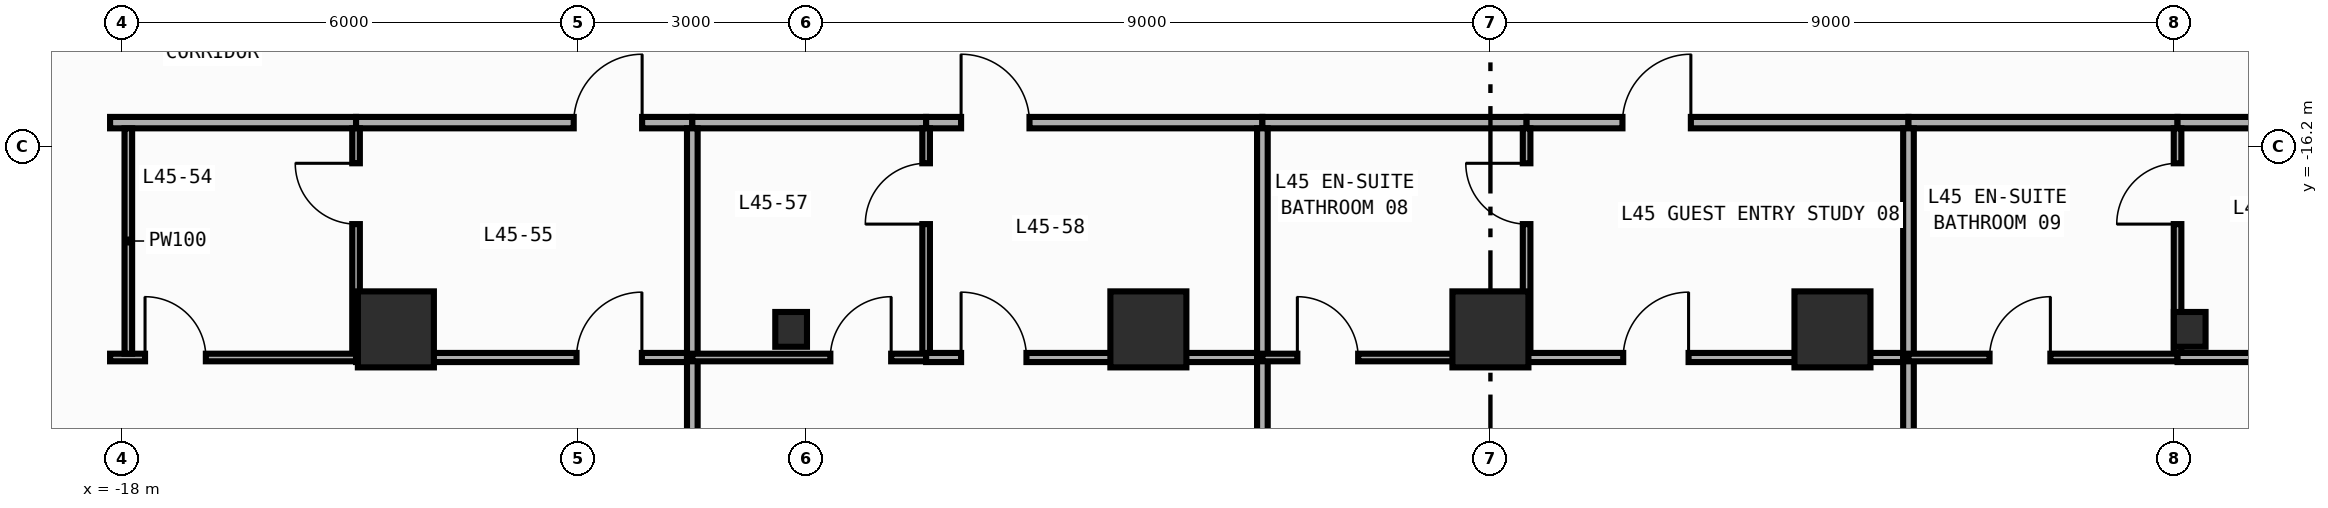
"""IFC4 building model, lengths in metres.
Left out: names, types, materials, properties, quantities, classifications, styles, units other than length and angle.
Written with IfcOpenShell. Run it as: python <this file> out.ifc"""

import sys

from ifc_helpers import new_model, si_unit, direction, frame, frame_2d, origin, origin_2d, place, context, subcontext, project, spatial, rectangle, i_section, extrude, element, fill, save


model = new_model("IFC4")
c1 = context("Model", 3, precision=1e-05, world=origin(), true_north=direction((0.0, 1.0)))
c2 = subcontext(c1, "Body", "Model", "MODEL_VIEW")
j1 = project(units=[si_unit("LENGTHUNIT", "METRE"), si_unit("PLANEANGLEUNIT", "RADIAN")], contexts=[c1])
p1 = place(None, origin())
s1 = spatial("IfcSite", under=j1, at=p1, CompositionType="ELEMENT")
p2 = place(p1, origin())
s2 = spatial("IfcBuilding", under=s1, at=p2, CompositionType="ELEMENT")
p3 = place(p2, frame((0.0, 0.0, 195.4)))
s3 = spatial("IfcBuildingStorey", under=s2, at=p3, CompositionType="ELEMENT", Elevation=195.4)
for number, where, z_axis, x_axis in (
    (1, (-9.2, -18.6, 0.0), (0.0, 0.0, 1.0), (1.0, 0.0, 0.0)),
    (2, (9.2, -18.6, 0.0), (0.0, 0.0, 1.0), (1.0, 0.0, 0.0)),
):
    element("IfcColumn", number, at=place(p3, frame(where, z_axis=z_axis, x_axis=x_axis)), inside=s3, PredefinedType="COLUMN", context=c2, shape_type="SweptSolid", body=[
        extrude(i_section(OverallWidth=0.417, OverallDepth=0.458, WebThickness=0.03, FlangeThickness=0.05, FilletRadius=0.022, at=origin_2d()), origin(), (0.0, 0.0, 1.0), 3.8),
    ])
for number, where, z_axis, x_axis in (
    (3, (-14.4, -18.6, 0.0), (0.0, 0.0, 1.0), (1.0, 0.0, 0.0)),
    (4, (-4.5, -18.6, 0.0), (0.0, 0.0, 1.0), (1.0, 0.0, 0.0)),
    (5, (0.0, -18.6, 0.0), (0.0, 0.0, 1.0), (1.0, 0.0, 0.0)),
    (6, (4.5, -18.6, 0.0), (0.0, 0.0, 1.0), (1.0, 0.0, 0.0)),
):
    element("IfcColumn", number, at=place(p3, frame(where, z_axis=z_axis, x_axis=x_axis)), inside=s3, PredefinedType="COLUMN", context=c2, shape_type="SweptSolid", body=[
        extrude(rectangle(XDim=1.0, YDim=1.0, at=origin_2d()), origin(), (0.0, 0.0, 1.0), 3.8),
    ])
p4 = place(p3, frame((-18.16, -15.88, 0.0), z_axis=(0.0, 0.0, 1.0), x_axis=(1.0, 0.0, 0.0)))
e7 = element("IfcWall", 7, at=p4, inside=s3, PredefinedType="PARTITIONING", context=c2, shape_type="SweptSolid", body=[
    extrude(rectangle(XDim=3.236, YDim=0.15, at=frame_2d((1.618, 0.0))), origin(), (0.0, 0.0, 1.0), 3.54),
])
p5 = place(p3, frame((-14.924, -15.88, 0.0), z_axis=(0.0, 0.0, 1.0), x_axis=(1.0, 0.0, 0.0)))
e8 = element("IfcWall", 8, at=p5, inside=s3, PredefinedType="PARTITIONING", context=c2, shape_type="SweptSolid", body=[
    extrude(rectangle(XDim=4.424, YDim=0.15, at=frame_2d((2.212, 0.0))), origin(), (0.0, 0.0, 1.0), 3.54),
])
p6 = place(p5, frame((2.864, 0.0, 0.0)))
e9 = element("IfcOpeningElement", 9, at=p6, cuts=e8, PredefinedType="OPENING", context=c2, shape_type="SweptSolid", body=[
    extrude(rectangle(XDim=0.9, YDim=2.15, at=frame_2d((0.45, 1.075))), frame((0.0, 0.085, 0.0), z_axis=(0.0, -1.0, 0.0), x_axis=(1.0, 0.0, 0.0)), (0.0, 0.0, 1.0), 0.17),
])
p7 = place(p3, frame((-10.5, -15.88, 0.0), z_axis=(0.0, 0.0, 1.0), x_axis=(1.0, 0.0, 0.0)))
e10 = element("IfcWall", 10, at=p7, inside=s3, PredefinedType="PARTITIONING", context=c2, shape_type="SweptSolid", body=[
    extrude(rectangle(XDim=3.076, YDim=0.15, at=frame_2d((1.538, 0.0))), origin(), (0.0, 0.0, 1.0), 3.54),
])
p8 = place(p3, frame((-7.424, -15.88, 0.0), z_axis=(0.0, 0.0, 1.0), x_axis=(1.0, 0.0, 0.0)))
e11 = element("IfcWall", 11, at=p8, inside=s3, PredefinedType="PARTITIONING", context=c2, shape_type="SweptSolid", body=[
    extrude(rectangle(XDim=4.424, YDim=0.15, at=frame_2d((2.212, 0.0))), origin(), (0.0, 0.0, 1.0), 3.54),
])
p9 = place(p8, frame((0.46, 0.0, 0.0)))
e12 = element("IfcOpeningElement", 12, at=p9, cuts=e11, PredefinedType="OPENING", context=c2, shape_type="SweptSolid", body=[
    extrude(rectangle(XDim=0.9, YDim=2.15, at=frame_2d((0.45, 1.075))), frame((0.0, 0.085, 0.0), z_axis=(0.0, -1.0, 0.0), x_axis=(1.0, 0.0, 0.0)), (0.0, 0.0, 1.0), 0.17),
])
p10 = place(p3, frame((-3.0, -15.88, 0.0), z_axis=(0.0, 0.0, 1.0), x_axis=(1.0, 0.0, 0.0)))
e13 = element("IfcWall", 13, at=p10, inside=s3, PredefinedType="PARTITIONING", context=c2, shape_type="SweptSolid", body=[
    extrude(rectangle(XDim=3.476, YDim=0.15, at=frame_2d((1.738, 0.0))), origin(), (0.0, 0.0, 1.0), 3.54),
])
p11 = place(p3, frame((0.476, -15.88, 0.0), z_axis=(0.0, 0.0, 1.0), x_axis=(1.0, 0.0, 0.0)))
e14 = element("IfcWall", 14, at=p11, inside=s3, PredefinedType="PARTITIONING", context=c2, shape_type="SweptSolid", body=[
    extrude(rectangle(XDim=5.024, YDim=0.15, at=frame_2d((2.512, 0.0))), origin(), (0.0, 0.0, 1.0), 3.54),
])
p12 = place(p11, frame((1.261, 0.0, 0.0)))
e15 = element("IfcOpeningElement", 15, at=p12, cuts=e14, PredefinedType="OPENING", context=c2, shape_type="SweptSolid", body=[
    extrude(rectangle(XDim=0.9, YDim=2.15, at=frame_2d((0.45, 1.075))), frame((0.0, 0.085, 0.0), z_axis=(0.0, -1.0, 0.0), x_axis=(1.0, 0.0, 0.0)), (0.0, 0.0, 1.0), 0.17),
])
p13 = place(p3, frame((5.5, -15.88, 0.0), z_axis=(0.0, 0.0, 1.0), x_axis=(1.0, 0.0, 0.0)))
e16 = element("IfcWall", 16, at=p13, inside=s3, PredefinedType="PARTITIONING", context=c2, shape_type="SweptSolid", body=[
    extrude(rectangle(XDim=3.54, YDim=0.15, at=frame_2d((1.77, 0.0))), origin(), (0.0, 0.0, 1.0), 3.54),
])
p14 = place(p3, frame((9.04, -15.88, 0.0), z_axis=(0.0, 0.0, 1.0), x_axis=(1.0, 0.0, 0.0)))
e17 = element("IfcWall", 17, at=p14, inside=s3, PredefinedType="PARTITIONING", context=c2, shape_type="SweptSolid", body=[
    extrude(rectangle(XDim=3.2, YDim=0.15, at=frame_2d((1.6, 0.0))), origin(), (0.0, 0.0, 1.0), 3.54),
])
p15 = place(p14, frame((1.61, 0.0, 0.0)))
e18 = element("IfcOpeningElement", 18, at=p15, cuts=e17, PredefinedType="OPENING", context=c2, shape_type="SweptSolid", body=[
    extrude(rectangle(XDim=0.9, YDim=2.15, at=frame_2d((0.45, 1.075))), frame((0.0, 0.085, 0.0), z_axis=(0.0, -1.0, 0.0), x_axis=(1.0, 0.0, 0.0)), (0.0, 0.0, 1.0), 0.17),
])
p16 = place(p3, frame((-14.924, -18.92, 0.0), z_axis=(0.0, 0.0, 1.0), x_axis=(0.0, 1.0, 0.0)))
e19 = element("IfcWall", 19, at=p16, inside=s3, PredefinedType="PARTITIONING", context=c2, shape_type="SweptSolid", body=[
    extrude(rectangle(XDim=2.965, YDim=0.1, at=frame_2d((1.482, 0.0))), origin(), (0.0, 0.0, 1.0), 3.54),
])
p17 = place(p16, frame((1.705, 0.0, 0.0)))
e20 = element("IfcOpeningElement", 20, at=p17, cuts=e19, PredefinedType="OPENING", context=c2, shape_type="SweptSolid", body=[
    extrude(rectangle(XDim=0.8, YDim=2.1, at=frame_2d((0.4, 1.05))), frame((0.0, 0.06, 0.0), z_axis=(0.0, -1.0, 0.0), x_axis=(1.0, 0.0, 0.0)), (0.0, 0.0, 1.0), 0.12),
])
p18 = place(p3, frame((-18.16, -18.97, 0.0), z_axis=(0.0, 0.0, 1.0), x_axis=(1.0, 0.0, 0.0)))
e21 = element("IfcWall", 21, at=p18, inside=s3, PredefinedType="PARTITIONING", context=c2, shape_type="SweptSolid", body=[
    extrude(rectangle(XDim=3.236, YDim=0.1, at=frame_2d((1.618, 0.0))), origin(), (0.0, 0.0, 1.0), 3.54),
])
p19 = place(p18, frame((0.46, 0.0, 0.0)))
e22 = element("IfcOpeningElement", 22, at=p19, cuts=e21, PredefinedType="OPENING", context=c2, shape_type="SweptSolid", body=[
    extrude(rectangle(XDim=0.8, YDim=2.1, at=frame_2d((0.4, 1.05))), frame((0.0, 0.06, 0.0), z_axis=(0.0, -1.0, 0.0), x_axis=(1.0, 0.0, 0.0)), (0.0, 0.0, 1.0), 0.12),
])
p20 = place(p3, frame((-14.924, -18.97, 0.0), z_axis=(0.0, 0.0, 1.0), x_axis=(1.0, 0.0, 0.0)))
e23 = element("IfcWall", 23, at=p20, inside=s3, PredefinedType="PARTITIONING", context=c2, shape_type="SweptSolid", body=[
    extrude(rectangle(XDim=4.424, YDim=0.12, at=frame_2d((2.212, 0.0))), origin(), (0.0, 0.0, 1.0), 3.54),
])
p21 = place(p20, frame((2.901, 0.0, 0.0)))
e24 = element("IfcOpeningElement", 24, at=p21, cuts=e23, PredefinedType="OPENING", context=c2, shape_type="SweptSolid", body=[
    extrude(rectangle(XDim=0.86, YDim=2.15, at=frame_2d((0.43, 1.075))), frame((0.0, 0.07, 0.0), z_axis=(0.0, -1.0, 0.0), x_axis=(1.0, 0.0, 0.0)), (0.0, 0.0, 1.0), 0.14),
])
p22 = place(p3, frame((-10.5, -18.97, 0.0), z_axis=(0.0, 0.0, 1.0), x_axis=(0.0, 1.0, 0.0)))
e25 = element("IfcWall", 25, at=p22, inside=s3, PredefinedType="PARTITIONING", context=c2, shape_type="SweptSolid", body=[
    extrude(rectangle(XDim=3.015, YDim=0.14, at=frame_2d((1.507, 0.0))), origin(), (0.0, 0.0, 1.0), 3.54),
])
p23 = place(p3, frame((-10.5, -25.322, 0.0), z_axis=(0.0, 0.0, 1.0), x_axis=(0.0, 1.0, 0.0)))
e26 = element("IfcWall", 26, at=p23, inside=s3, PredefinedType="PARTITIONING", context=c2, shape_type="SweptSolid", body=[
    extrude(rectangle(XDim=6.352, YDim=0.14, at=frame_2d((3.176, 0.0))), origin(), (0.0, 0.0, 1.0), 3.54),
])
p24 = place(p3, frame((-7.424, -18.92, 0.0), z_axis=(0.0, 0.0, 1.0), x_axis=(0.0, 1.0, 0.0)))
e27 = element("IfcWall", 27, at=p24, inside=s3, PredefinedType="PARTITIONING", context=c2, shape_type="SweptSolid", body=[
    extrude(rectangle(XDim=2.965, YDim=0.1, at=frame_2d((1.482, 0.0))), origin(), (0.0, 0.0, 1.0), 3.54),
])
p25 = place(p24, frame((1.705, 0.0, 0.0)))
e28 = element("IfcOpeningElement", 28, at=p25, cuts=e27, PredefinedType="OPENING", context=c2, shape_type="SweptSolid", body=[
    extrude(rectangle(XDim=0.8, YDim=2.1, at=frame_2d((0.4, 1.05))), frame((0.0, 0.06, 0.0), z_axis=(0.0, -1.0, 0.0), x_axis=(1.0, 0.0, 0.0)), (0.0, 0.0, 1.0), 0.12),
])
p26 = place(p3, frame((-10.5, -18.97, 0.0), z_axis=(0.0, 0.0, 1.0), x_axis=(1.0, 0.0, 0.0)))
e29 = element("IfcWall", 29, at=p26, inside=s3, PredefinedType="PARTITIONING", context=c2, shape_type="SweptSolid", body=[
    extrude(rectangle(XDim=3.076, YDim=0.1, at=frame_2d((1.538, 0.0))), origin(), (0.0, 0.0, 1.0), 3.54),
])
p27 = place(p26, frame((1.816, 0.0, 0.0)))
e30 = element("IfcOpeningElement", 30, at=p27, cuts=e29, PredefinedType="OPENING", context=c2, shape_type="SweptSolid", body=[
    extrude(rectangle(XDim=0.8, YDim=2.1, at=frame_2d((0.4, 1.05))), frame((0.0, 0.06, 0.0), z_axis=(0.0, -1.0, 0.0), x_axis=(1.0, 0.0, 0.0)), (0.0, 0.0, 1.0), 0.12),
])
p28 = place(p3, frame((-7.424, -18.97, 0.0), z_axis=(0.0, 0.0, 1.0), x_axis=(1.0, 0.0, 0.0)))
e31 = element("IfcWall", 31, at=p28, inside=s3, PredefinedType="PARTITIONING", context=c2, shape_type="SweptSolid", body=[
    extrude(rectangle(XDim=4.424, YDim=0.12, at=frame_2d((2.212, 0.0))), origin(), (0.0, 0.0, 1.0), 3.54),
])
p29 = place(p28, frame((0.46, 0.0, 0.0)))
e32 = element("IfcOpeningElement", 32, at=p29, cuts=e31, PredefinedType="OPENING", context=c2, shape_type="SweptSolid", body=[
    extrude(rectangle(XDim=0.86, YDim=2.15, at=frame_2d((0.43, 1.075))), frame((0.0, 0.07, 0.0), z_axis=(0.0, -1.0, 0.0), x_axis=(1.0, 0.0, 0.0)), (0.0, 0.0, 1.0), 0.14),
])
p30 = place(p3, frame((-3.0, -18.97, 0.0), z_axis=(0.0, 0.0, 1.0), x_axis=(0.0, 1.0, 0.0)))
e33 = element("IfcWall", 33, at=p30, inside=s3, PredefinedType="PARTITIONING", context=c2, shape_type="SweptSolid", body=[
    extrude(rectangle(XDim=3.015, YDim=0.14, at=frame_2d((1.507, 0.0))), origin(), (0.0, 0.0, 1.0), 3.54),
])
p31 = place(p3, frame((-3.0, -25.285, 0.0), z_axis=(0.0, 0.0, 1.0), x_axis=(0.0, 1.0, 0.0)))
e34 = element("IfcWall", 34, at=p31, inside=s3, PredefinedType="PARTITIONING", context=c2, shape_type="SweptSolid", body=[
    extrude(rectangle(XDim=6.315, YDim=0.14, at=frame_2d((3.157, 0.0))), origin(), (0.0, 0.0, 1.0), 3.54),
])
p32 = place(p3, frame((0.476, -18.92, 0.0), z_axis=(0.0, 0.0, 1.0), x_axis=(0.0, 1.0, 0.0)))
e35 = element("IfcWall", 35, at=p32, inside=s3, PredefinedType="PARTITIONING", context=c2, shape_type="SweptSolid", body=[
    extrude(rectangle(XDim=2.965, YDim=0.1, at=frame_2d((1.482, 0.0))), origin(), (0.0, 0.0, 1.0), 3.54),
])
p33 = place(p32, frame((1.705, 0.0, 0.0)))
e36 = element("IfcOpeningElement", 36, at=p33, cuts=e35, PredefinedType="OPENING", context=c2, shape_type="SweptSolid", body=[
    extrude(rectangle(XDim=0.8, YDim=2.1, at=frame_2d((0.4, 1.05))), frame((0.0, 0.06, 0.0), z_axis=(0.0, -1.0, 0.0), x_axis=(1.0, 0.0, 0.0)), (0.0, 0.0, 1.0), 0.12),
])
p34 = place(p3, frame((-3.0, -18.97, 0.0), z_axis=(0.0, 0.0, 1.0), x_axis=(1.0, 0.0, 0.0)))
e37 = element("IfcWall", 37, at=p34, inside=s3, PredefinedType="PARTITIONING", context=c2, shape_type="SweptSolid", body=[
    extrude(rectangle(XDim=3.476, YDim=0.1, at=frame_2d((1.738, 0.0))), origin(), (0.0, 0.0, 1.0), 3.54),
])
p35 = place(p34, frame((0.46, 0.0, 0.0)))
e38 = element("IfcOpeningElement", 38, at=p35, cuts=e37, PredefinedType="OPENING", context=c2, shape_type="SweptSolid", body=[
    extrude(rectangle(XDim=0.8, YDim=2.1, at=frame_2d((0.4, 1.05))), frame((0.0, 0.06, 0.0), z_axis=(0.0, -1.0, 0.0), x_axis=(1.0, 0.0, 0.0)), (0.0, 0.0, 1.0), 0.12),
])
p36 = place(p3, frame((0.476, -18.97, 0.0), z_axis=(0.0, 0.0, 1.0), x_axis=(1.0, 0.0, 0.0)))
e39 = element("IfcWall", 39, at=p36, inside=s3, PredefinedType="PARTITIONING", context=c2, shape_type="SweptSolid", body=[
    extrude(rectangle(XDim=5.024, YDim=0.12, at=frame_2d((2.512, 0.0))), origin(), (0.0, 0.0, 1.0), 3.54),
])
p37 = place(p36, frame((1.271, 0.0, 0.0)))
e40 = element("IfcOpeningElement", 40, at=p37, cuts=e39, PredefinedType="OPENING", context=c2, shape_type="SweptSolid", body=[
    extrude(rectangle(XDim=0.86, YDim=2.15, at=frame_2d((0.43, 1.075))), frame((0.0, 0.07, 0.0), z_axis=(0.0, -1.0, 0.0), x_axis=(1.0, 0.0, 0.0)), (0.0, 0.0, 1.0), 0.14),
])
p38 = place(p3, frame((5.5, -18.97, 0.0), z_axis=(0.0, 0.0, 1.0), x_axis=(0.0, 1.0, 0.0)))
e41 = element("IfcWall", 41, at=p38, inside=s3, PredefinedType="PARTITIONING", context=c2, shape_type="SweptSolid", body=[
    extrude(rectangle(XDim=3.015, YDim=0.14, at=frame_2d((1.507, 0.0))), origin(), (0.0, 0.0, 1.0), 3.54),
])
p39 = place(p3, frame((5.5, -25.243, 0.0), z_axis=(0.0, 0.0, 1.0), x_axis=(0.0, 1.0, 0.0)))
e42 = element("IfcWall", 42, at=p39, inside=s3, PredefinedType="PARTITIONING", context=c2, shape_type="SweptSolid", body=[
    extrude(rectangle(XDim=6.273, YDim=0.14, at=frame_2d((3.136, 0.0))), origin(), (0.0, 0.0, 1.0), 3.54),
])
p40 = place(p3, frame((9.04, -18.92, 0.0), z_axis=(0.0, 0.0, 1.0), x_axis=(0.0, 1.0, 0.0)))
e43 = element("IfcWall", 43, at=p40, inside=s3, PredefinedType="PARTITIONING", context=c2, shape_type="SweptSolid", body=[
    extrude(rectangle(XDim=2.965, YDim=0.1, at=frame_2d((1.482, 0.0))), origin(), (0.0, 0.0, 1.0), 2.952),
])
p41 = place(p40, frame((1.705, 0.0, 0.0)))
e44 = element("IfcOpeningElement", 44, at=p41, cuts=e43, PredefinedType="OPENING", context=c2, shape_type="SweptSolid", body=[
    extrude(rectangle(XDim=0.8, YDim=2.1, at=frame_2d((0.4, 1.05))), frame((0.0, 0.06, 0.0), z_axis=(0.0, -1.0, 0.0), x_axis=(1.0, 0.0, 0.0)), (0.0, 0.0, 1.0), 0.12),
])
p42 = place(p3, frame((5.5, -18.97, 0.0), z_axis=(0.0, 0.0, 1.0), x_axis=(1.0, 0.0, 0.0)))
e45 = element("IfcWall", 45, at=p42, inside=s3, PredefinedType="PARTITIONING", context=c2, shape_type="SweptSolid", body=[
    extrude(rectangle(XDim=3.54, YDim=0.1, at=frame_2d((1.77, 0.0))), origin(), (0.0, 0.0, 1.0), 3.54),
])
p43 = place(p42, frame((1.067, 0.0, 0.0)))
e46 = element("IfcOpeningElement", 46, at=p43, cuts=e45, PredefinedType="OPENING", context=c2, shape_type="SweptSolid", body=[
    extrude(rectangle(XDim=0.8, YDim=2.1, at=frame_2d((0.4, 1.05))), frame((0.0, 0.06, 0.0), z_axis=(0.0, -1.0, 0.0), x_axis=(1.0, 0.0, 0.0)), (0.0, 0.0, 1.0), 0.12),
])
p44 = place(p3, frame((9.04, -18.97, 0.0), z_axis=(0.0, 0.0, 1.0), x_axis=(1.0, 0.0, 0.0)))
e47 = element("IfcWall", 47, at=p44, inside=s3, PredefinedType="PARTITIONING", context=c2, shape_type="SweptSolid", body=[
    extrude(rectangle(XDim=3.2, YDim=0.12, at=frame_2d((1.6, 0.0))), origin(), (0.0, 0.0, 1.0), 3.54),
])
p45 = place(p44, frame((1.677, 0.0, 0.0)))
e48 = element("IfcOpeningElement", 48, at=p45, cuts=e47, PredefinedType="OPENING", context=c2, shape_type="SweptSolid", body=[
    extrude(rectangle(XDim=0.86, YDim=2.15, at=frame_2d((0.43, 1.075))), frame((0.0, 0.07, 0.0), z_axis=(0.0, -1.0, 0.0), x_axis=(1.0, 0.0, 0.0)), (0.0, 0.0, 1.0), 0.14),
])
p46 = place(p3, frame((-17.92, -18.92, 0.0), z_axis=(0.0, 0.0, 1.0), x_axis=(0.0, 1.0, 0.0)))
e49 = element("IfcWall", 49, at=p46, inside=s3, PredefinedType="PARTITIONING", context=c2, shape_type="SweptSolid", body=[
    extrude(rectangle(XDim=2.965, YDim=0.1, at=frame_2d((1.482, 0.0))), origin(), (0.0, 0.0, 1.0), 3.54),
])
p47 = place(p6, origin())
e50 = element("IfcDoor", 50, at=p47, inside=s3, OperationType="SINGLE_SWING_RIGHT", PredefinedType="DOOR", context=c2, shape_type="SweptSolid", body=[
    extrude(rectangle(XDim=0.9, YDim=2.15, at=frame_2d((0.45, 1.075))), frame((0.0, 0.025, 0.0), z_axis=(0.0, -1.0, 0.0), x_axis=(1.0, 0.0, 0.0)), (0.0, 0.0, 1.0), 0.05),
])
fill(e9, e50)
p48 = place(p9, origin())
e51 = element("IfcDoor", 51, at=p48, inside=s3, OperationType="SINGLE_SWING_LEFT", PredefinedType="DOOR", context=c2, shape_type="SweptSolid", body=[
    extrude(rectangle(XDim=0.9, YDim=2.15, at=frame_2d((0.45, 1.075))), frame((0.0, 0.025, 0.0), z_axis=(0.0, -1.0, 0.0), x_axis=(1.0, 0.0, 0.0)), (0.0, 0.0, 1.0), 0.05),
])
fill(e12, e51)
p49 = place(p12, origin())
e52 = element("IfcDoor", 52, at=p49, inside=s3, OperationType="SINGLE_SWING_RIGHT", PredefinedType="DOOR", context=c2, shape_type="SweptSolid", body=[
    extrude(rectangle(XDim=0.9, YDim=2.15, at=frame_2d((0.45, 1.075))), frame((0.0, 0.025, 0.0), z_axis=(0.0, -1.0, 0.0), x_axis=(1.0, 0.0, 0.0)), (0.0, 0.0, 1.0), 0.05),
])
fill(e15, e52)
p50 = place(p17, origin())
e53 = element("IfcDoor", 53, at=p50, inside=s3, OperationType="SINGLE_SWING_RIGHT", PredefinedType="DOOR", context=c2, shape_type="SweptSolid", body=[
    extrude(rectangle(XDim=0.8, YDim=2.1, at=frame_2d((0.4, 1.05))), frame((0.0, 0.025, 0.0), z_axis=(0.0, -1.0, 0.0), x_axis=(1.0, 0.0, 0.0)), (0.0, 0.0, 1.0), 0.05),
])
fill(e20, e53)
p51 = place(p19, origin())
e54 = element("IfcDoor", 54, at=p51, inside=s3, OperationType="SINGLE_SWING_LEFT", PredefinedType="DOOR", context=c2, shape_type="SweptSolid", body=[
    extrude(rectangle(XDim=0.8, YDim=2.1, at=frame_2d((0.4, 1.05))), frame((0.0, 0.025, 0.0), z_axis=(0.0, -1.0, 0.0), x_axis=(1.0, 0.0, 0.0)), (0.0, 0.0, 1.0), 0.05),
])
fill(e22, e54)
p52 = place(p21, origin())
e55 = element("IfcDoor", 55, at=p52, inside=s3, OperationType="SINGLE_SWING_RIGHT", PredefinedType="DOOR", context=c2, shape_type="SweptSolid", body=[
    extrude(rectangle(XDim=0.86, YDim=2.15, at=frame_2d((0.43, 1.075))), frame((0.0, 0.025, 0.0), z_axis=(0.0, -1.0, 0.0), x_axis=(1.0, 0.0, 0.0)), (0.0, 0.0, 1.0), 0.05),
])
fill(e24, e55)
p53 = place(p25, origin())
e56 = element("IfcDoor", 56, at=p53, inside=s3, OperationType="SINGLE_SWING_LEFT", PredefinedType="DOOR", context=c2, shape_type="SweptSolid", body=[
    extrude(rectangle(XDim=0.8, YDim=2.1, at=frame_2d((0.4, 1.05))), frame((0.0, 0.025, 0.0), z_axis=(0.0, -1.0, 0.0), x_axis=(1.0, 0.0, 0.0)), (0.0, 0.0, 1.0), 0.05),
])
fill(e28, e56)
p54 = place(p27, origin())
e57 = element("IfcDoor", 57, at=p54, inside=s3, OperationType="SINGLE_SWING_RIGHT", PredefinedType="DOOR", context=c2, shape_type="SweptSolid", body=[
    extrude(rectangle(XDim=0.8, YDim=2.1, at=frame_2d((0.4, 1.05))), frame((0.0, 0.025, 0.0), z_axis=(0.0, -1.0, 0.0), x_axis=(1.0, 0.0, 0.0)), (0.0, 0.0, 1.0), 0.05),
])
fill(e30, e57)
p55 = place(p29, origin())
e58 = element("IfcDoor", 58, at=p55, inside=s3, OperationType="SINGLE_SWING_LEFT", PredefinedType="DOOR", context=c2, shape_type="SweptSolid", body=[
    extrude(rectangle(XDim=0.86, YDim=2.15, at=frame_2d((0.43, 1.075))), frame((0.0, 0.025, 0.0), z_axis=(0.0, -1.0, 0.0), x_axis=(1.0, 0.0, 0.0)), (0.0, 0.0, 1.0), 0.05),
])
fill(e32, e58)
p56 = place(p33, origin())
e59 = element("IfcDoor", 59, at=p56, inside=s3, OperationType="SINGLE_SWING_RIGHT", PredefinedType="DOOR", context=c2, shape_type="SweptSolid", body=[
    extrude(rectangle(XDim=0.8, YDim=2.1, at=frame_2d((0.4, 1.05))), frame((0.0, 0.025, 0.0), z_axis=(0.0, -1.0, 0.0), x_axis=(1.0, 0.0, 0.0)), (0.0, 0.0, 1.0), 0.05),
])
fill(e36, e59)
p57 = place(p35, origin())
e60 = element("IfcDoor", 60, at=p57, inside=s3, OperationType="SINGLE_SWING_LEFT", PredefinedType="DOOR", context=c2, shape_type="SweptSolid", body=[
    extrude(rectangle(XDim=0.8, YDim=2.1, at=frame_2d((0.4, 1.05))), frame((0.0, 0.025, 0.0), z_axis=(0.0, -1.0, 0.0), x_axis=(1.0, 0.0, 0.0)), (0.0, 0.0, 1.0), 0.05),
])
fill(e38, e60)
p58 = place(p37, origin())
e61 = element("IfcDoor", 61, at=p58, inside=s3, OperationType="SINGLE_SWING_RIGHT", PredefinedType="DOOR", context=c2, shape_type="SweptSolid", body=[
    extrude(rectangle(XDim=0.86, YDim=2.15, at=frame_2d((0.43, 1.075))), frame((0.0, 0.025, 0.0), z_axis=(0.0, -1.0, 0.0), x_axis=(1.0, 0.0, 0.0)), (0.0, 0.0, 1.0), 0.05),
])
fill(e40, e61)
p59 = place(p41, origin())
e62 = element("IfcDoor", 62, at=p59, inside=s3, OperationType="SINGLE_SWING_LEFT", PredefinedType="DOOR", context=c2, shape_type="SweptSolid", body=[
    extrude(rectangle(XDim=0.8, YDim=2.1, at=frame_2d((0.4, 1.05))), frame((0.0, 0.025, 0.0), z_axis=(0.0, -1.0, 0.0), x_axis=(1.0, 0.0, 0.0)), (0.0, 0.0, 1.0), 0.05),
])
fill(e44, e62)
p60 = place(p43, origin())
e63 = element("IfcDoor", 63, at=p60, inside=s3, OperationType="SINGLE_SWING_RIGHT", PredefinedType="DOOR", context=c2, shape_type="SweptSolid", body=[
    extrude(rectangle(XDim=0.8, YDim=2.1, at=frame_2d((0.4, 1.05))), frame((0.0, 0.025, 0.0), z_axis=(0.0, -1.0, 0.0), x_axis=(1.0, 0.0, 0.0)), (0.0, 0.0, 1.0), 0.05),
])
fill(e46, e63)
save(model, sys.argv[1])
